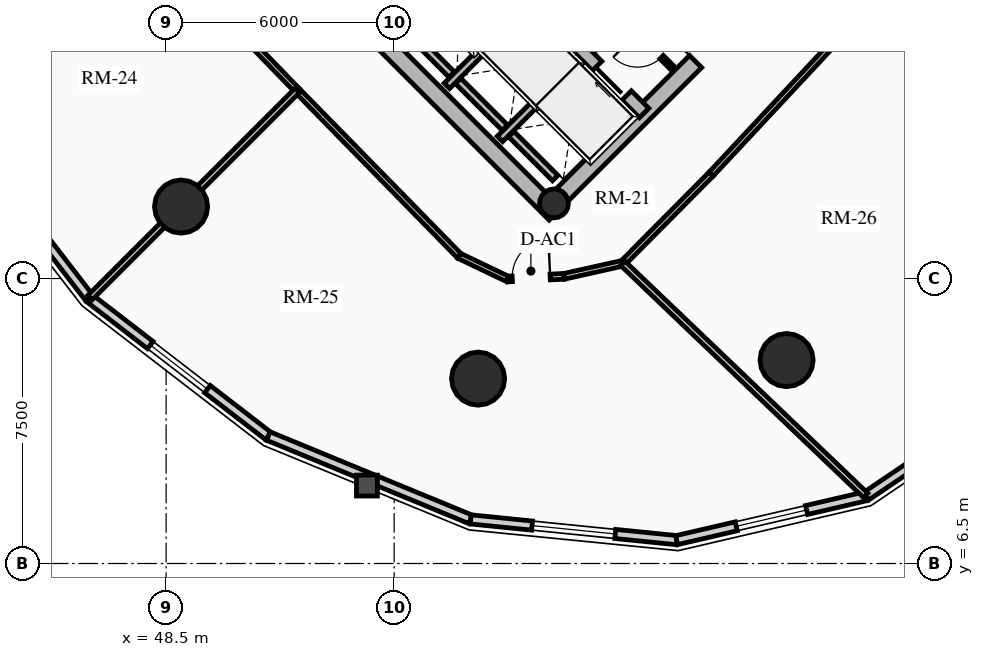
"""IFC4 building model, lengths in metres.
Left out: names, types, materials, properties, quantities, classifications, styles, units other than length and angle.
Written with IfcOpenShell. Run it as: python <this file> out.ifc"""

import sys

from ifc_helpers import new_model, si_unit, direction, frame, frame_2d, origin, origin_2d, place, context, subcontext, project, spatial, rectangle, circle, hollow_circle, extrude, source, transform, mapped, element, fill, save


model = new_model("IFC4")
c1 = context("Model", 3, precision=1e-05, world=origin(), true_north=direction((0.0, 1.0)))
c2 = subcontext(c1, "Body", "Model", "MODEL_VIEW")
j1 = project(units=[si_unit("LENGTHUNIT", "METRE"), si_unit("PLANEANGLEUNIT", "RADIAN")], contexts=[c1])
p1 = place(None, origin())
s1 = spatial("IfcSite", under=j1, at=p1, CompositionType="ELEMENT")
p2 = place(p1, origin())
s2 = spatial("IfcBuilding", under=s1, at=p2, CompositionType="ELEMENT")
p3 = place(p2, frame((0.0, 0.0, 132.88)))
s3 = spatial("IfcBuildingStorey", under=s2, at=p3, CompositionType="ELEMENT", Elevation=132.88)
p4 = place(p3, frame((58.737, 15.697, 0.0), z_axis=(0.0, 0.0, 1.0), x_axis=(-0.707106781187, 0.707106781187, 0.0)))
e1 = element("IfcWall", 1, at=p4, inside=s3, PredefinedType="SHEAR", context=c2, shape_type="SweptSolid", body=[
    extrude(rectangle(XDim=14.2, YDim=0.45, at=frame_2d((7.1, 0.0))), origin(), (0.0, 0.0, 1.0), 3.72),
])
p5 = place(p3, frame((58.578, 15.856, 0.0), z_axis=(0.0, 0.0, 1.0), x_axis=(0.707106781187, 0.707106781187, 0.0)))
e2 = element("IfcWall", 2, at=p5, inside=s3, PredefinedType="SHEAR", context=c2, shape_type="SweptSolid", body=[
    extrude(rectangle(XDim=10.7, YDim=0.45, at=frame_2d((5.35, 0.0))), origin(), (0.0, 0.0, 1.0), 3.72),
])
m1 = source(origin(), c2, "Body", "SweptSolid", [
    extrude(rectangle(XDim=1.5, YDim=2.02, at=frame_2d((0.75, 1.01))), frame((0.0, 0.235, 0.0), z_axis=(0.0, -1.0, 0.0), x_axis=(1.0, 0.0, 0.0)), (0.0, 0.0, 1.0), 0.47),
])
p6 = place(p5, frame((5.45, 0.0, 0.0)))
e3 = element("IfcOpeningElement", 3, at=p6, cuts=e2, PredefinedType="OPENING", context=c2, shape_type="MappedRepresentation", body=[
    mapped(m1, transform((0.0, 0.0, 0.0), x_axis=(1.0, 0.0, 0.0), y_axis=(0.0, 1.0, 0.0), z_axis=(0.0, 0.0, 1.0), scale=1.0)),
])
p7 = place(p3, frame((61.078, 18.355, 0.0), z_axis=(0.0, 0.0, 1.0), x_axis=(-0.707106781187, 0.707106781187, 0.0)))
e4 = element("IfcWall", 4, at=p7, inside=s3, PredefinedType="SHEAR", context=c2, shape_type="SweptSolid", body=[
    extrude(rectangle(XDim=13.75, YDim=0.35, at=frame_2d((6.875, 0.0))), origin(), (0.0, 0.0, 1.0), 3.72),
])
m2 = source(origin(), c2, "Body", "SweptSolid", [
    extrude(rectangle(XDim=1.1, YDim=2.015, at=frame_2d((0.55, 1.007))), frame((0.0, 0.185, 0.0), z_axis=(0.0, -1.0, 0.0), x_axis=(1.0, 0.0, 0.0)), (0.0, 0.0, 1.0), 0.37),
])
p8 = place(p7, frame((4.875, 0.0, 0.0)))
e5 = element("IfcOpeningElement", 5, at=p8, cuts=e4, PredefinedType="OPENING", context=c2, shape_type="MappedRepresentation", body=[
    mapped(m2, transform((0.0, 0.0, 0.0), x_axis=(1.0, 0.0, 0.0), y_axis=(0.0, 1.0, 0.0), z_axis=(0.0, 0.0, 1.0), scale=1.0)),
])
p9 = place(p7, frame((0.65, 0.0, 0.0)))
e6 = element("IfcOpeningElement", 6, at=p9, cuts=e4, PredefinedType="OPENING", context=c2, shape_type="MappedRepresentation", body=[
    mapped(m2, transform((0.0, 0.0, 0.0), x_axis=(1.0, 0.0, 0.0), y_axis=(0.0, 1.0, 0.0), z_axis=(0.0, 0.0, 1.0), scale=1.0)),
])
p10 = place(p7, frame((2.65, 0.0, 0.0)))
e7 = element("IfcOpeningElement", 7, at=p10, cuts=e4, PredefinedType="OPENING", context=c2, shape_type="MappedRepresentation", body=[
    mapped(m2, transform((0.0, 0.0, 0.0), x_axis=(1.0, 0.0, 0.0), y_axis=(0.0, 1.0, 0.0), z_axis=(0.0, 0.0, 1.0), scale=1.0)),
])
m3 = source(origin(), c2, "Body", "SweptSolid", [
    extrude(rectangle(XDim=1.15, YDim=2.02, at=frame_2d((0.575, 1.01))), frame((0.0, 0.185, 0.0), z_axis=(0.0, -1.0, 0.0), x_axis=(1.0, 0.0, 0.0)), (0.0, 0.0, 1.0), 0.37),
])
p11 = place(p7, frame((7.295, 0.0, 0.0)))
e8 = element("IfcOpeningElement", 8, at=p11, cuts=e4, PredefinedType="OPENING", context=c2, shape_type="MappedRepresentation", body=[
    mapped(m3, transform((0.0, 0.0, 0.0), x_axis=(1.0, 0.0, 0.0), y_axis=(0.0, 1.0, 0.0), z_axis=(0.0, 0.0, 1.0), scale=1.0)),
])
p12 = place(p3, frame((58.706, 15.976, 0.0), z_axis=(0.0, 0.0, 1.0), x_axis=(0.707106781187, 0.707106781187, 0.0)))
e9 = element("IfcColumn", 9, at=p12, inside=s3, PredefinedType="COLUMN", context=c2, shape_type="SweptSolid", body=[
    extrude(hollow_circle(Radius=0.38, WallThickness=0.032, at=origin_2d()), origin(), (0.0, 0.0, 1.0), 3.72),
])
for number, where, z_axis, x_axis in (
    (10, (48.893, 15.893, 0.0), (0.0, 0.0, 1.0), (1.0, 0.0, 0.0)),
    (11, (56.709, 11.365, 0.0), (0.0, 0.0, 1.0), (1.0, 0.0, 0.0)),
    (12, (64.827, 11.854, 0.0), (0.0, 0.0, 1.0), (1.0, 0.0, 0.0)),
):
    element("IfcColumn", number, at=place(p3, frame(where, z_axis=z_axis, x_axis=x_axis)), inside=s3, PredefinedType="USERDEFINED", context=c2, shape_type="SweptSolid", body=[
        extrude(circle(Radius=0.7, at=origin_2d()), origin(), (0.0, 0.0, 1.0), 3.72),
    ])
p13 = place(p3, frame((46.483, 13.483, 0.0), z_axis=(0.0, 0.0, 1.0), x_axis=(-0.61054437102, 0.791982052206, 0.0)))
e13 = element("IfcWall", 13, at=p13, inside=s3, PredefinedType="SOLIDWALL", context=c2, shape_type="SweptSolid", body=[
    extrude(rectangle(XDim=5.942, YDim=0.24, at=frame_2d((2.971, 0.0))), origin(), (0.0, 0.0, 1.0), 2.949),
])
p14 = place(p3, frame((51.189, 9.855, 0.0), z_axis=(0.0, 0.0, 1.0), x_axis=(-0.791982052206, 0.61054437102, 0.0)))
e14 = element("IfcWall", 14, at=p14, inside=s3, PredefinedType="SOLIDWALL", context=c2, shape_type="SweptSolid", body=[
    extrude(rectangle(XDim=5.942, YDim=0.24, at=frame_2d((2.971, 0.0))), origin(), (0.0, 0.0, 1.0), 2.949),
])
m4 = source(origin(), c2, "Body", "SweptSolid", [
    extrude(rectangle(XDim=1.9, YDim=1.35, at=frame_2d((0.95, 0.675))), frame((0.0, 0.13, 0.0), z_axis=(0.0, -1.0, 0.0), x_axis=(1.0, 0.0, 0.0)), (0.0, 0.0, 1.0), 0.26),
])
p15 = place(p14, frame((2.021, 0.0, 0.65)))
e15 = element("IfcOpeningElement", 15, at=p15, cuts=e14, PredefinedType="OPENING", context=c2, shape_type="MappedRepresentation", body=[
    mapped(m4, transform((0.0, 0.0, 0.0), x_axis=(1.0, 0.0, 0.0), y_axis=(0.0, 1.0, 0.0), z_axis=(0.0, 0.0, 1.0), scale=1.0)),
])
p16 = place(p3, frame((56.513, 7.661, 0.0), z_axis=(0.0, 0.0, 1.0), x_axis=(-0.924563909604, 0.381027003055, 0.0)))
e16 = element("IfcWall", 16, at=p16, inside=s3, PredefinedType="SOLIDWALL", context=c2, shape_type="SweptSolid", body=[
    extrude(rectangle(XDim=5.758, YDim=0.24, at=frame_2d((2.879, 0.0))), origin(), (0.0, 0.0, 1.0), 2.949),
])
p17 = place(p3, frame((61.933, 7.115, 0.0), z_axis=(0.0, 0.0, 1.0), x_axis=(-0.994971754311, 0.10015591906, 0.0)))
e17 = element("IfcWall", 17, at=p17, inside=s3, PredefinedType="SOLIDWALL", context=c2, shape_type="SweptSolid", body=[
    extrude(rectangle(XDim=5.448, YDim=0.24, at=frame_2d((2.724, 0.0))), origin(), (0.0, 0.0, 1.0), 2.949),
])
m5 = source(origin(), c2, "Body", "SweptSolid", [
    extrude(rectangle(XDim=2.2, YDim=1.35, at=frame_2d((1.1, 0.675))), frame((0.0, 0.13, 0.0), z_axis=(0.0, -1.0, 0.0), x_axis=(1.0, 0.0, 0.0)), (0.0, 0.0, 1.0), 0.26),
])
p18 = place(p17, frame((1.624, 0.0, 0.65)))
e18 = element("IfcOpeningElement", 18, at=p18, cuts=e17, PredefinedType="OPENING", context=c2, shape_type="MappedRepresentation", body=[
    mapped(m5, transform((0.0, 0.0, 0.0), x_axis=(1.0, 0.0, 0.0), y_axis=(0.0, 1.0, 0.0), z_axis=(0.0, 0.0, 1.0), scale=1.0)),
])
p19 = place(p3, frame((66.92, 8.271, 0.0), z_axis=(0.0, 0.0, 1.0), x_axis=(-0.974165631126, -0.225834725257, 0.0)))
e19 = element("IfcWall", 19, at=p19, inside=s3, PredefinedType="SOLIDWALL", context=c2, shape_type="SweptSolid", body=[
    extrude(rectangle(XDim=5.119, YDim=0.24, at=frame_2d((2.56, 0.0))), origin(), (0.0, 0.0, 1.0), 2.949),
])
p20 = place(p19, frame((1.609, 0.0, 0.65)))
e20 = element("IfcOpeningElement", 20, at=p20, cuts=e19, PredefinedType="OPENING", context=c2, shape_type="MappedRepresentation", body=[
    mapped(m4, transform((0.0, 0.0, 0.0), x_axis=(1.0, 0.0, 0.0), y_axis=(0.0, 1.0, 0.0), z_axis=(0.0, 0.0, 1.0), scale=1.0)),
])
p21 = place(p3, frame((70.985, 11.015, 0.0), z_axis=(0.0, 0.0, 1.0), x_axis=(-0.828781148131, -0.559572880421, 0.0)))
e21 = element("IfcWall", 21, at=p21, inside=s3, PredefinedType="SOLIDWALL", context=c2, shape_type="SweptSolid", body=[
    extrude(rectangle(XDim=4.905, YDim=0.24, at=frame_2d((2.452, 0.0))), origin(), (0.0, 0.0, 1.0), 2.949),
])
p22 = place(p3, frame((55.888, 19.069, 0.0), z_axis=(0.0, 0.0, 1.0), x_axis=(0.707106781187, 0.707106781187, 0.0)))
e22 = element("IfcWall", 22, at=p22, inside=s3, PredefinedType="SHEAR", context=c2, shape_type="SweptSolid", body=[
    extrude(rectangle(XDim=2.97, YDim=0.2, at=frame_2d((1.485, 0.0))), origin(), (0.0, 0.0, 1.0), 3.72),
])
p23 = place(p3, frame((56.015, 19.366, 0.0), z_axis=(0.0, 0.0, 1.0), x_axis=(-0.707106781187, 0.707106781187, 0.0)))
e23 = element("IfcWall", 23, at=p23, inside=s3, PredefinedType="SHEAR", context=c2, shape_type="SweptSolid", body=[
    extrude(rectangle(XDim=2.44, YDim=0.2, at=frame_2d((1.22, 0.0))), origin(), (0.0, 0.0, 1.0), 3.72),
])
p24 = place(p3, frame((57.284, 17.673, 0.0), z_axis=(0.0, 0.0, 1.0), x_axis=(0.707147878904, 0.70706568108, 0.0)))
e24 = element("IfcWall", 24, at=p24, inside=s3, PredefinedType="SHEAR", context=c2, shape_type="SweptSolid", body=[
    extrude(rectangle(XDim=2.97, YDim=0.2, at=frame_2d((1.485, 0.0))), origin(), (0.0, 0.0, 1.0), 3.72),
])
p25 = place(p3, frame((57.412, 17.97, 0.0), z_axis=(0.0, 0.0, 1.0), x_axis=(-0.707106781187, 0.707106781187, 0.0)))
e25 = element("IfcWall", 25, at=p25, inside=s3, PredefinedType="SHEAR", context=c2, shape_type="SweptSolid", body=[
    extrude(rectangle(XDim=1.735, YDim=0.2, at=frame_2d((0.867, 0.0))), origin(), (0.0, 0.0, 1.0), 3.72),
])
p26 = place(p3, frame((58.737, 16.644, 0.0), z_axis=(0.0, 0.0, 1.0), x_axis=(-0.707032117043, 0.707181437447, 0.0)))
e26 = element("IfcWall", 26, at=p26, inside=s3, PredefinedType="SHEAR", context=c2, shape_type="SweptSolid", body=[
    extrude(rectangle(XDim=1.635, YDim=0.2, at=frame_2d((0.817, 0.0))), origin(), (0.0, 0.0, 1.0), 3.72),
])
p27 = place(p3, frame((61.835, 19.529, 0.0), z_axis=(0.0, 0.0, 1.0), x_axis=(-0.707174592913, 0.707038962956, 0.0)))
e27 = element("IfcWall", 27, at=p27, inside=s3, PredefinedType="PARTITIONING", context=c2, shape_type="SweptSolid", body=[
    extrude(rectangle(XDim=1.8, YDim=0.125, at=frame_2d((0.9, 0.0))), origin(), (0.0, 0.0, 1.0), 3.425),
])
m6 = source(origin(), c2, "Body", "SweptSolid", [
    extrude(rectangle(XDim=0.9, YDim=2.005, at=frame_2d((0.45, 1.002))), frame((0.0, 0.073, 0.0), z_axis=(0.0, -1.0, 0.0), x_axis=(1.0, 0.0, 0.0)), (0.0, 0.0, 1.0), 0.145),
])
p28 = place(p27, frame((0.42, 0.0, 0.0)))
e28 = element("IfcOpeningElement", 28, at=p28, cuts=e27, PredefinedType="OPENING", context=c2, shape_type="MappedRepresentation", body=[
    mapped(m6, transform((0.0, 0.0, 0.0), x_axis=(1.0, 0.0, 0.0), y_axis=(0.0, 1.0, 0.0), z_axis=(0.0, 0.0, 1.0), scale=1.0)),
])
p29 = place(p3, frame((47.786, 23.242, 0.0), z_axis=(0.0, 0.0, 1.0), x_axis=(0.696183456981, -0.717863910659, 0.0)))
e29 = element("IfcWall", 29, at=p29, inside=s3, PredefinedType="PARTITIONING", context=c2, shape_type="SweptSolid", body=[
    extrude(rectangle(XDim=5.979, YDim=0.15, at=frame_2d((2.99, 0.0))), origin(), (0.0, 0.0, 1.0), 3.425),
])
p30 = place(p3, frame((51.949, 18.949, 0.0), z_axis=(0.0, 0.0, 1.0), x_axis=(0.699801520154, -0.714337337951, 0.0)))
e30 = element("IfcWall", 30, at=p30, inside=s3, PredefinedType="PARTITIONING", context=c2, shape_type="SweptSolid", body=[
    extrude(rectangle(XDim=6.097, YDim=0.15, at=frame_2d((3.048, 0.0))), origin(), (0.0, 0.0, 1.0), 2.995),
])
p31 = place(p3, frame((56.216, 14.594, 0.0), z_axis=(0.0, 0.0, 1.0), x_axis=(0.902219207281, -0.431277755064, 0.0)))
e31 = element("IfcWall", 31, at=p31, inside=s3, PredefinedType="PARTITIONING", context=c2, shape_type="SweptSolid", body=[
    extrude(rectangle(XDim=1.41, YDim=0.15, at=frame_2d((0.705, 0.0))), origin(), (0.0, 0.0, 1.0), 2.995),
])
p32 = place(p3, frame((57.488, 13.986, 0.0), z_axis=(0.0, 0.0, 1.0), x_axis=(0.998863298217, 0.047666670476, 0.0)))
e32 = element("IfcWall", 32, at=p32, inside=s3, PredefinedType="PARTITIONING", context=c2, shape_type="SweptSolid", body=[
    extrude(rectangle(XDim=1.485, YDim=0.15, at=frame_2d((0.743, 0.0))), origin(), (0.0, 0.0, 1.0), 2.995),
])
m7 = source(origin(), c2, "Body", "SweptSolid", [
    extrude(rectangle(XDim=1.0, YDim=2.015, at=frame_2d((0.5, 1.007))), frame((0.0, 0.085, 0.0), z_axis=(0.0, -1.0, 0.0), x_axis=(1.0, 0.0, 0.0)), (0.0, 0.0, 1.0), 0.17),
])
p33 = place(p32, frame((0.12, 0.0, 0.0)))
e33 = element("IfcOpeningElement", 33, at=p33, cuts=e32, PredefinedType="OPENING", context=c2, shape_type="MappedRepresentation", body=[
    mapped(m7, transform((0.0, 0.0, 0.0), x_axis=(1.0, 0.0, 0.0), y_axis=(0.0, 1.0, 0.0), z_axis=(0.0, 0.0, 1.0), scale=1.0)),
])
p34 = place(p3, frame((58.971, 14.057, 0.0), z_axis=(0.0, 0.0, 1.0), x_axis=(0.976085233804, 0.217388169756, 0.0)))
e34 = element("IfcWall", 34, at=p34, inside=s3, PredefinedType="PARTITIONING", context=c2, shape_type="SweptSolid", body=[
    extrude(rectangle(XDim=1.581, YDim=0.15, at=frame_2d((0.791, 0.0))), origin(), (0.0, 0.0, 1.0), 2.995),
])
p35 = place(p3, frame((60.515, 14.401, 0.0), z_axis=(0.0, 0.0, 1.0), x_axis=(0.704179607439, 0.710021887316, 0.0)))
e35 = element("IfcWall", 35, at=p35, inside=s3, PredefinedType="PARTITIONING", context=c2, shape_type="SweptSolid", body=[
    extrude(rectangle(XDim=3.301, YDim=0.15, at=frame_2d((1.651, 0.0))), origin(), (0.0, 0.0, 1.0), 2.995),
])
p36 = place(p3, frame((62.839, 16.745, 0.0), z_axis=(0.0, 0.0, 1.0), x_axis=(0.682386779427, 0.73099130177, 0.0)))
e36 = element("IfcWall", 36, at=p36, inside=s3, PredefinedType="PARTITIONING", context=c2, shape_type="SweptSolid", body=[
    extrude(rectangle(XDim=6.6, YDim=0.15, at=frame_2d((3.3, 0.0))), origin(), (0.0, 0.0, 1.0), 2.995),
])
p37 = place(p3, frame((51.949, 18.949, 0.0), z_axis=(0.0, 0.0, 1.0), x_axis=(-0.707106781187, -0.707106781187, 0.0)))
e37 = element("IfcWall", 37, at=p37, inside=s3, PredefinedType="PARTITIONING", context=c2, shape_type="SweptSolid", body=[
    extrude(rectangle(XDim=7.711, YDim=0.16, at=frame_2d((3.855, 0.0))), origin(), (0.0, 0.0, 1.0), 2.512),
])
p38 = place(p3, frame((60.515, 14.401, 0.0), z_axis=(0.0, 0.0, 1.0), x_axis=(0.722998961483, -0.690849116446, 0.0)))
e38 = element("IfcWall", 38, at=p38, inside=s3, PredefinedType="PARTITIONING", context=c2, shape_type="SweptSolid", body=[
    extrude(rectangle(XDim=8.847, YDim=0.16, at=frame_2d((4.423, 0.0))), origin(), (0.0, 0.0, 1.0), 2.949),
])
m8 = source(origin(), c2, "Body", "SweptSolid", [
    extrude(rectangle(XDim=1.9, YDim=1.35, at=frame_2d((0.95, 0.675))), frame((0.0, 0.03, 0.0), z_axis=(0.0, -1.0, 0.0), x_axis=(1.0, 0.0, 0.0)), (0.0, 0.0, 1.0), 0.06),
])
p39 = place(p15, origin())
e39 = element("IfcWindow", 39, at=p39, inside=s3, PartitioningType="DOUBLE_PANEL_VERTICAL", PredefinedType="WINDOW", context=c2, shape_type="MappedRepresentation", body=[
    mapped(m8, transform((0.0, 0.0, 0.0), x_axis=(1.0, 0.0, 0.0), y_axis=(0.0, 1.0, 0.0), z_axis=(0.0, 0.0, 1.0), scale=1.0)),
])
fill(e15, e39)
m9 = source(origin(), c2, "Body", "SweptSolid", [
    extrude(rectangle(XDim=2.2, YDim=1.35, at=frame_2d((1.1, 0.675))), frame((0.0, 0.03, 0.0), z_axis=(0.0, -1.0, 0.0), x_axis=(1.0, 0.0, 0.0)), (0.0, 0.0, 1.0), 0.06),
])
p40 = place(p18, origin())
e40 = element("IfcWindow", 40, at=p40, inside=s3, PartitioningType="DOUBLE_PANEL_VERTICAL", PredefinedType="WINDOW", context=c2, shape_type="MappedRepresentation", body=[
    mapped(m9, transform((0.0, 0.0, 0.0), x_axis=(1.0, 0.0, 0.0), y_axis=(0.0, 1.0, 0.0), z_axis=(0.0, 0.0, 1.0), scale=1.0)),
])
fill(e18, e40)
p41 = place(p20, origin())
e41 = element("IfcWindow", 41, at=p41, inside=s3, PartitioningType="DOUBLE_PANEL_VERTICAL", PredefinedType="WINDOW", context=c2, shape_type="MappedRepresentation", body=[
    mapped(m8, transform((0.0, 0.0, 0.0), x_axis=(1.0, 0.0, 0.0), y_axis=(0.0, 1.0, 0.0), z_axis=(0.0, 0.0, 1.0), scale=1.0)),
])
fill(e20, e41)
m10 = source(origin(), c2, "Body", "SweptSolid", [
    extrude(rectangle(XDim=1.1, YDim=2.015, at=frame_2d((0.55, 1.007))), frame((0.0, 0.025, 0.0), z_axis=(0.0, -1.0, 0.0), x_axis=(1.0, 0.0, 0.0)), (0.0, 0.0, 1.0), 0.05),
])
p42 = place(p9, origin())
e42 = element("IfcDoor", 42, at=p42, inside=s3, OperationType="SLIDING_TO_RIGHT", PredefinedType="DOOR", context=c2, shape_type="MappedRepresentation", body=[
    mapped(m10, transform((0.0, 0.0, 0.0), x_axis=(1.0, 0.0, 0.0), y_axis=(0.0, 1.0, 0.0), z_axis=(0.0, 0.0, 1.0), scale=1.0)),
])
fill(e6, e42)
m11 = source(origin(), c2, "Body", "SweptSolid", [
    extrude(rectangle(XDim=1.5, YDim=2.02, at=frame_2d((0.75, 1.01))), frame((0.0, 0.025, 0.0), z_axis=(0.0, -1.0, 0.0), x_axis=(1.0, 0.0, 0.0)), (0.0, 0.0, 1.0), 0.05),
])
p43 = place(p6, origin())
e43 = element("IfcDoor", 43, at=p43, inside=s3, OperationType="DOUBLE_DOOR_SINGLE_SWING", PredefinedType="DOOR", context=c2, shape_type="MappedRepresentation", body=[
    mapped(m11, transform((0.0, 0.0, 0.0), x_axis=(1.0, 0.0, 0.0), y_axis=(0.0, 1.0, 0.0), z_axis=(0.0, 0.0, 1.0), scale=1.0)),
])
fill(e3, e43)
m12 = source(origin(), c2, "Body", "SweptSolid", [
    extrude(rectangle(XDim=0.9, YDim=2.005, at=frame_2d((0.45, 1.002))), frame((0.0, 0.025, 0.0), z_axis=(0.0, -1.0, 0.0), x_axis=(1.0, 0.0, 0.0)), (0.0, 0.0, 1.0), 0.05),
])
p44 = place(p28, origin())
e44 = element("IfcDoor", 44, at=p44, inside=s3, OperationType="SINGLE_SWING_RIGHT", PredefinedType="DOOR", context=c2, shape_type="MappedRepresentation", body=[
    mapped(m12, transform((0.0, 0.0, 0.0), x_axis=(1.0, 0.0, 0.0), y_axis=(0.0, 1.0, 0.0), z_axis=(0.0, 0.0, 1.0), scale=1.0)),
])
fill(e28, e44)
m13 = source(origin(), c2, "Body", "SweptSolid", [
    extrude(rectangle(XDim=1.0, YDim=2.015, at=frame_2d((0.5, 1.007))), frame((0.0, 0.025, 0.0), z_axis=(0.0, -1.0, 0.0), x_axis=(1.0, 0.0, 0.0)), (0.0, 0.0, 1.0), 0.05),
])
p45 = place(p33, origin())
e45 = element("IfcDoor", 45, at=p45, inside=s3, OperationType="SINGLE_SWING_RIGHT", PredefinedType="DOOR", context=c2, shape_type="MappedRepresentation", body=[
    mapped(m13, transform((0.0, 0.0, 0.0), x_axis=(1.0, 0.0, 0.0), y_axis=(0.0, 1.0, 0.0), z_axis=(0.0, 0.0, 1.0), scale=1.0)),
])
fill(e33, e45)
save(model, sys.argv[1])
